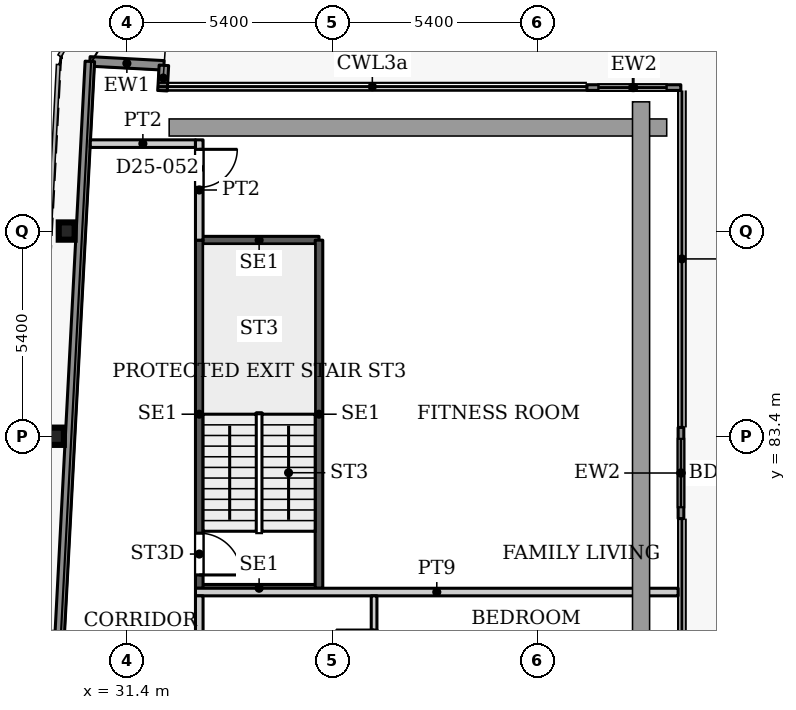
"""IFC4 building model, lengths in metres.
Left out: names, types, materials, properties, quantities, classifications, styles, units other than length and angle.
Written with IfcOpenShell. Run it as: python <this file> out.ifc"""

import sys

from ifc_helpers import new_model, si_unit, direction, frame, frame_2d, origin, origin_2d, place, context, subcontext, project, spatial, rectangle, i_section, extrude, source, transform, mapped, element, fill, save


model = new_model("IFC4")
c1 = context("Model", 3, precision=1e-05, world=origin(), true_north=direction((0.0, 1.0)))
c2 = subcontext(c1, "Body", "Model", "MODEL_VIEW")
j1 = project(units=[si_unit("LENGTHUNIT", "METRE"), si_unit("PLANEANGLEUNIT", "RADIAN")], contexts=[c1])
p1 = place(None, origin())
s1 = spatial("IfcSite", under=j1, at=p1, CompositionType="ELEMENT")
p2 = place(p1, origin())
s2 = spatial("IfcBuilding", under=s1, at=p2, CompositionType="ELEMENT")
p3 = place(p2, frame((0.0, 0.0, 113.6)))
s3 = spatial("IfcBuildingStorey", under=s2, at=p3, CompositionType="ELEMENT", Elevation=113.6)
for number, where, z_axis, x_axis in (
    (1, (29.527, 83.4, 0.0), (0.0, 0.0, 1.0), (1.0, 0.0, 0.0)),
    (2, (29.811, 88.8, 0.0), (0.0, 0.0, 1.0), (1.0, 0.0, 0.0)),
):
    element("IfcColumn", number, at=place(p3, frame(where, z_axis=z_axis, x_axis=x_axis)), inside=s3, PredefinedType="COLUMN", context=c2, shape_type="SweptSolid", body=[
        extrude(i_section(OverallWidth=0.418, OverallDepth=0.455, WebThickness=0.042, FlangeThickness=0.068, FilletRadius=0.014, at=origin_2d()), origin(), (0.0, 0.0, 1.0), 3.9),
    ])
p4 = place(p3, frame((30.421, 93.264, 0.0), z_axis=(0.0, 0.0, 1.0), x_axis=(0.998577785791, -0.053314216913, 0.0)))
e3 = element("IfcWall", 3, at=p4, inside=s3, PredefinedType="SOLIDWALL", context=c2, shape_type="SweptSolid", body=[
    extrude(rectangle(XDim=1.951, YDim=0.25, at=frame_2d((0.975, 0.0))), origin(), (0.0, 0.0, 1.0), 3.75),
])
p5 = place(p3, frame((32.369, 93.16, 0.0), z_axis=(0.0, 0.0, 1.0), x_axis=(-0.053729014033, -0.998555553312, 0.0)))
e4 = element("IfcWall", 4, at=p5, inside=s3, PredefinedType="SOLIDWALL", context=c2, shape_type="SweptSolid", body=[
    extrude(rectangle(XDim=0.668, YDim=0.25, at=frame_2d((0.334, 0.0))), origin(), (0.0, 0.0, 1.0), 3.75),
])
p6 = place(p3, frame((43.5, 92.575, 0.0), z_axis=(0.0, 0.0, 1.0), x_axis=(1.0, 0.0, 0.0)))
e5 = element("IfcWall", 5, at=p6, inside=s3, PredefinedType="SOLIDWALL", context=c2, shape_type="SweptSolid", body=[
    extrude(rectangle(XDim=2.471, YDim=0.15, at=frame_2d((1.235, 0.0))), origin(), (0.0, 0.0, 1.0), 3.75),
])
p7 = place(p6, frame((0.3, 0.0, 0.0)))
e6 = element("IfcOpeningElement", 6, at=p7, cuts=e5, PredefinedType="OPENING", context=c2, shape_type="SweptSolid", body=[
    extrude(rectangle(XDim=1.8, YDim=2.4, at=frame_2d((0.9, 1.2))), frame((0.0, 0.085, 0.0), z_axis=(0.0, -1.0, 0.0), x_axis=(1.0, 0.0, 0.0)), (0.0, 0.0, 1.0), 0.17),
])
p8 = place(p3, frame((45.975, 83.632, 0.0), z_axis=(0.0, 0.0, 1.0), x_axis=(0.0, -1.0, 0.0)))
e7 = element("IfcWall", 7, at=p8, inside=s3, PredefinedType="SOLIDWALL", context=c2, shape_type="SweptSolid", body=[
    extrude(rectangle(XDim=2.399, YDim=0.15, at=frame_2d((1.2, 0.0))), origin(), (0.0, 0.0, 1.0), 3.75),
])
p9 = place(p8, frame((0.3, 0.0, 0.0)))
e8 = element("IfcOpeningElement", 8, at=p9, cuts=e7, PredefinedType="OPENING", context=c2, shape_type="SweptSolid", body=[
    extrude(rectangle(XDim=1.8, YDim=2.4, at=frame_2d((0.9, 1.2))), frame((0.0, 0.085, 0.0), z_axis=(0.0, -1.0, 0.0), x_axis=(1.0, 0.0, 0.0)), (0.0, 0.0, 1.0), 0.17),
])
p10 = place(p3, frame((27.195, 31.969, 0.0), z_axis=(0.0, 0.0, 1.0), x_axis=(0.052555284099, 0.998618016117, 0.0)))
e9 = element("IfcWall", 9, at=p10, inside=s3, PredefinedType="SOLIDWALL", context=c2, shape_type="SweptSolid", body=[
    extrude(rectangle(XDim=61.38, YDim=0.25, at=frame_2d((30.69, 0.0))), origin(), (0.0, 0.0, 1.0), 3.75),
])
for number, where, z_axis, x_axis in (
    (10, (33.3, 79.4, 0.0), (0.0, 0.0, 1.0), (1.0, 0.0, 0.0)),
    (11, (33.3, 88.56, 0.0), (0.0, 0.0, 1.0), (1.0, 0.0, 0.0)),
):
    element("IfcWall", number, at=place(p3, frame(where, z_axis=z_axis, x_axis=x_axis)), inside=s3, PredefinedType="SHEAR", context=c2, shape_type="SweptSolid", body=[
        extrude(rectangle(XDim=3.15, YDim=0.2, at=frame_2d((1.575, 0.0))), origin(), (0.0, 0.0, 1.0), 3.9),
    ])
p11 = place(p3, frame((33.3, 79.4, 0.0), z_axis=(0.0, 0.0, 1.0), x_axis=(0.0, 1.0, 0.0)))
e12 = element("IfcWall", 12, at=p11, inside=s3, PredefinedType="SHEAR", context=c2, shape_type="SweptSolid", body=[
    extrude(rectangle(XDim=9.16, YDim=0.2, at=frame_2d((4.58, 0.0))), origin(), (0.0, 0.0, 1.0), 3.9),
])
p12 = place(p11, frame((0.35, 0.0, 0.0)))
e13 = element("IfcOpeningElement", 13, at=p12, cuts=e12, PredefinedType="OPENING", context=c2, shape_type="SweptSolid", body=[
    extrude(rectangle(XDim=1.1, YDim=2.2, at=frame_2d((0.55, 1.1))), frame((0.0, 0.11, 0.0), z_axis=(0.0, -1.0, 0.0), x_axis=(1.0, 0.0, 0.0)), (0.0, 0.0, 1.0), 0.22),
])
p13 = place(p3, frame((36.45, 79.4, 0.0), z_axis=(0.0, 0.0, 1.0), x_axis=(0.0, 1.0, 0.0)))
e14 = element("IfcWall", 14, at=p13, inside=s3, PredefinedType="SHEAR", context=c2, shape_type="SweptSolid", body=[
    extrude(rectangle(XDim=9.16, YDim=0.2, at=frame_2d((4.58, 0.0))), origin(), (0.0, 0.0, 1.0), 3.9),
])
p14 = place(p3, frame((30.432, 91.1, 0.0), z_axis=(0.0, 0.0, 1.0), x_axis=(1.0, 0.0, 0.0)))
e15 = element("IfcWall", 15, at=p14, inside=s3, PredefinedType="PARTITIONING", context=c2, shape_type="SweptSolid", body=[
    extrude(rectangle(XDim=2.768, YDim=0.2, at=frame_2d((1.384, 0.0))), origin(), (0.0, 0.0, 1.0), 3.6),
])
p15 = place(p3, frame((33.2, 79.3, 0.0), z_axis=(0.0, 0.0, 1.0), x_axis=(1.0, 0.0, 0.0)))
e16 = element("IfcWall", 16, at=p15, inside=s3, PredefinedType="PARTITIONING", context=c2, shape_type="SweptSolid", body=[
    extrude(rectangle(XDim=12.7, YDim=0.2, at=frame_2d((6.35, 0.0))), origin(), (0.0, 0.0, 1.0), 3.6),
])
p16 = place(p3, frame((33.3, 54.4, 0.0), z_axis=(0.0, 0.0, 1.0), x_axis=(0.0, 1.0, 0.0)))
e17 = element("IfcWall", 17, at=p16, inside=s3, PredefinedType="PARTITIONING", context=c2, shape_type="SweptSolid", body=[
    extrude(rectangle(XDim=24.8, YDim=0.2, at=frame_2d((12.4, 0.0))), origin(), (0.0, 0.0, 1.0), 3.6),
])
p17 = place(p16, frame((2.5, 0.0, 0.0)))
e18 = element("IfcOpeningElement", 18, at=p17, cuts=e17, PredefinedType="OPENING", context=c2, shape_type="SweptSolid", body=[
    extrude(rectangle(XDim=1.0, YDim=2.1, at=frame_2d((0.5, 1.05))), frame((0.0, 0.11, 0.0), z_axis=(0.0, -1.0, 0.0), x_axis=(1.0, 0.0, 0.0)), (0.0, 0.0, 1.0), 0.22),
])
p18 = place(p16, frame((22.6, 0.0, 0.0)))
e19 = element("IfcOpeningElement", 19, at=p18, cuts=e17, PredefinedType="OPENING", context=c2, shape_type="SweptSolid", body=[
    extrude(rectangle(XDim=1.0, YDim=2.1, at=frame_2d((0.5, 1.05))), frame((0.0, 0.11, 0.0), z_axis=(0.0, -1.0, 0.0), x_axis=(1.0, 0.0, 0.0)), (0.0, 0.0, 1.0), 0.22),
])
p19 = place(p3, frame((33.3, 88.56, 0.0), z_axis=(0.0, 0.0, 1.0), x_axis=(0.0, 1.0, 0.0)))
e20 = element("IfcWall", 20, at=p19, inside=s3, PredefinedType="PARTITIONING", context=c2, shape_type="SweptSolid", body=[
    extrude(rectangle(XDim=2.64, YDim=0.2, at=frame_2d((1.32, 0.0))), origin(), (0.0, 0.0, 1.0), 3.6),
])
p20 = place(p19, frame((1.39, 0.0, 0.0)))
e21 = element("IfcOpeningElement", 21, at=p20, cuts=e20, PredefinedType="OPENING", context=c2, shape_type="SweptSolid", body=[
    extrude(rectangle(XDim=1.0, YDim=2.1, at=frame_2d((0.5, 1.05))), frame((0.0, 0.11, 0.0), z_axis=(0.0, -1.0, 0.0), x_axis=(1.0, 0.0, 0.0)), (0.0, 0.0, 1.0), 0.22),
])
p21 = place(p3, frame((37.9, 63.5, 0.0), z_axis=(0.0, 0.0, 1.0), x_axis=(0.0, 1.0, 0.0)))
e22 = element("IfcWall", 22, at=p21, inside=s3, PredefinedType="PARTITIONING", context=c2, shape_type="SweptSolid", body=[
    extrude(rectangle(XDim=15.7, YDim=0.15, at=frame_2d((7.85, 0.0))), origin(), (0.0, 0.0, 1.0), 3.6),
])
p22 = place(p21, frame((1.1, 0.0, 0.0)))
e23 = element("IfcOpeningElement", 23, at=p22, cuts=e22, PredefinedType="OPENING", context=c2, shape_type="SweptSolid", body=[
    extrude(rectangle(XDim=0.9, YDim=2.1, at=frame_2d((0.45, 1.05))), frame((0.0, 0.085, 0.0), z_axis=(0.0, -1.0, 0.0), x_axis=(1.0, 0.0, 0.0)), (0.0, 0.0, 1.0), 0.17),
])
p23 = place(p21, frame((10.85, 0.0, 0.0)))
e24 = element("IfcOpeningElement", 24, at=p23, cuts=e22, PredefinedType="OPENING", context=c2, shape_type="SweptSolid", body=[
    extrude(rectangle(XDim=0.9, YDim=2.1, at=frame_2d((0.45, 1.05))), frame((0.0, 0.085, 0.0), z_axis=(0.0, -1.0, 0.0), x_axis=(1.0, 0.0, 0.0)), (0.0, 0.0, 1.0), 0.17),
])
p24 = place(p21, frame((13.8, 0.0, 0.0)))
e25 = element("IfcOpeningElement", 25, at=p24, cuts=e22, PredefinedType="OPENING", context=c2, shape_type="SweptSolid", body=[
    extrude(rectangle(XDim=1.0, YDim=2.1, at=frame_2d((0.5, 1.05))), frame((0.0, 0.085, 0.0), z_axis=(0.0, -1.0, 0.0), x_axis=(1.0, 0.0, 0.0)), (0.0, 0.0, 1.0), 0.17),
])
p25 = place(p21, frame((4.1, 0.0, 0.0)))
e26 = element("IfcOpeningElement", 26, at=p25, cuts=e22, PredefinedType="OPENING", context=c2, shape_type="SweptSolid", body=[
    extrude(rectangle(XDim=0.9, YDim=2.1, at=frame_2d((0.45, 1.05))), frame((0.0, 0.085, 0.0), z_axis=(0.0, -1.0, 0.0), x_axis=(1.0, 0.0, 0.0)), (0.0, 0.0, 1.0), 0.17),
])
p26 = place(p21, frame((8.45, 0.0, 0.0)))
e27 = element("IfcOpeningElement", 27, at=p26, cuts=e22, PredefinedType="OPENING", context=c2, shape_type="SweptSolid", body=[
    extrude(rectangle(XDim=0.9, YDim=2.1, at=frame_2d((0.45, 1.05))), frame((0.0, 0.085, 0.0), z_axis=(0.0, -1.0, 0.0), x_axis=(1.0, 0.0, 0.0)), (0.0, 0.0, 1.0), 0.17),
])
m1 = source(origin(), c2, "Body", "SweptSolid", [
    extrude(rectangle(XDim=1.8, YDim=2.4, at=frame_2d((0.9, 1.2))), frame((0.0, 0.025, 0.0), z_axis=(0.0, -1.0, 0.0), x_axis=(1.0, 0.0, 0.0)), (0.0, 0.0, 1.0), 0.05),
])
p27 = place(p7, origin())
e28 = element("IfcDoor", 28, at=p27, inside=s3, OperationType="SLIDING_TO_LEFT", PredefinedType="DOOR", context=c2, shape_type="MappedRepresentation", body=[
    mapped(m1, transform((0.0, 0.0, 0.0), x_axis=(1.0, 0.0, 0.0), y_axis=(0.0, 1.0, 0.0), z_axis=(0.0, 0.0, 1.0), scale=1.0)),
])
fill(e6, e28)
p28 = place(p9, origin())
e29 = element("IfcDoor", 29, at=p28, inside=s3, OperationType="SLIDING_TO_LEFT", PredefinedType="DOOR", context=c2, shape_type="MappedRepresentation", body=[
    mapped(m1, transform((0.0, 0.0, 0.0), x_axis=(1.0, 0.0, 0.0), y_axis=(0.0, 1.0, 0.0), z_axis=(0.0, 0.0, 1.0), scale=1.0)),
])
fill(e8, e29)
m2 = source(origin(), c2, "Body", "SweptSolid", [
    extrude(rectangle(XDim=1.1, YDim=2.2, at=frame_2d((0.55, 1.1))), frame((0.0, 0.025, 0.0), z_axis=(0.0, -1.0, 0.0), x_axis=(1.0, 0.0, 0.0)), (0.0, 0.0, 1.0), 0.05),
])
p29 = place(p12, origin())
e30 = element("IfcDoor", 30, at=p29, inside=s3, OperationType="SINGLE_SWING_RIGHT", PredefinedType="DOOR", context=c2, shape_type="MappedRepresentation", body=[
    mapped(m2, transform((0.0, 0.0, 0.0), x_axis=(1.0, 0.0, 0.0), y_axis=(0.0, 1.0, 0.0), z_axis=(0.0, 0.0, 1.0), scale=1.0)),
])
fill(e13, e30)
m3 = source(origin(), c2, "Body", "SweptSolid", [
    extrude(rectangle(XDim=1.0, YDim=2.1, at=frame_2d((0.5, 1.05))), frame((0.0, 0.025, 0.0), z_axis=(0.0, -1.0, 0.0), x_axis=(1.0, 0.0, 0.0)), (0.0, 0.0, 1.0), 0.05),
])
p30 = place(p20, origin())
e31 = element("IfcDoor", 31, at=p30, inside=s3, OperationType="SINGLE_SWING_RIGHT", PredefinedType="DOOR", context=c2, shape_type="MappedRepresentation", body=[
    mapped(m3, transform((0.0, 0.0, 0.0), x_axis=(1.0, 0.0, 0.0), y_axis=(0.0, 1.0, 0.0), z_axis=(0.0, 0.0, 1.0), scale=1.0)),
])
fill(e21, e31)
save(model, sys.argv[1])
